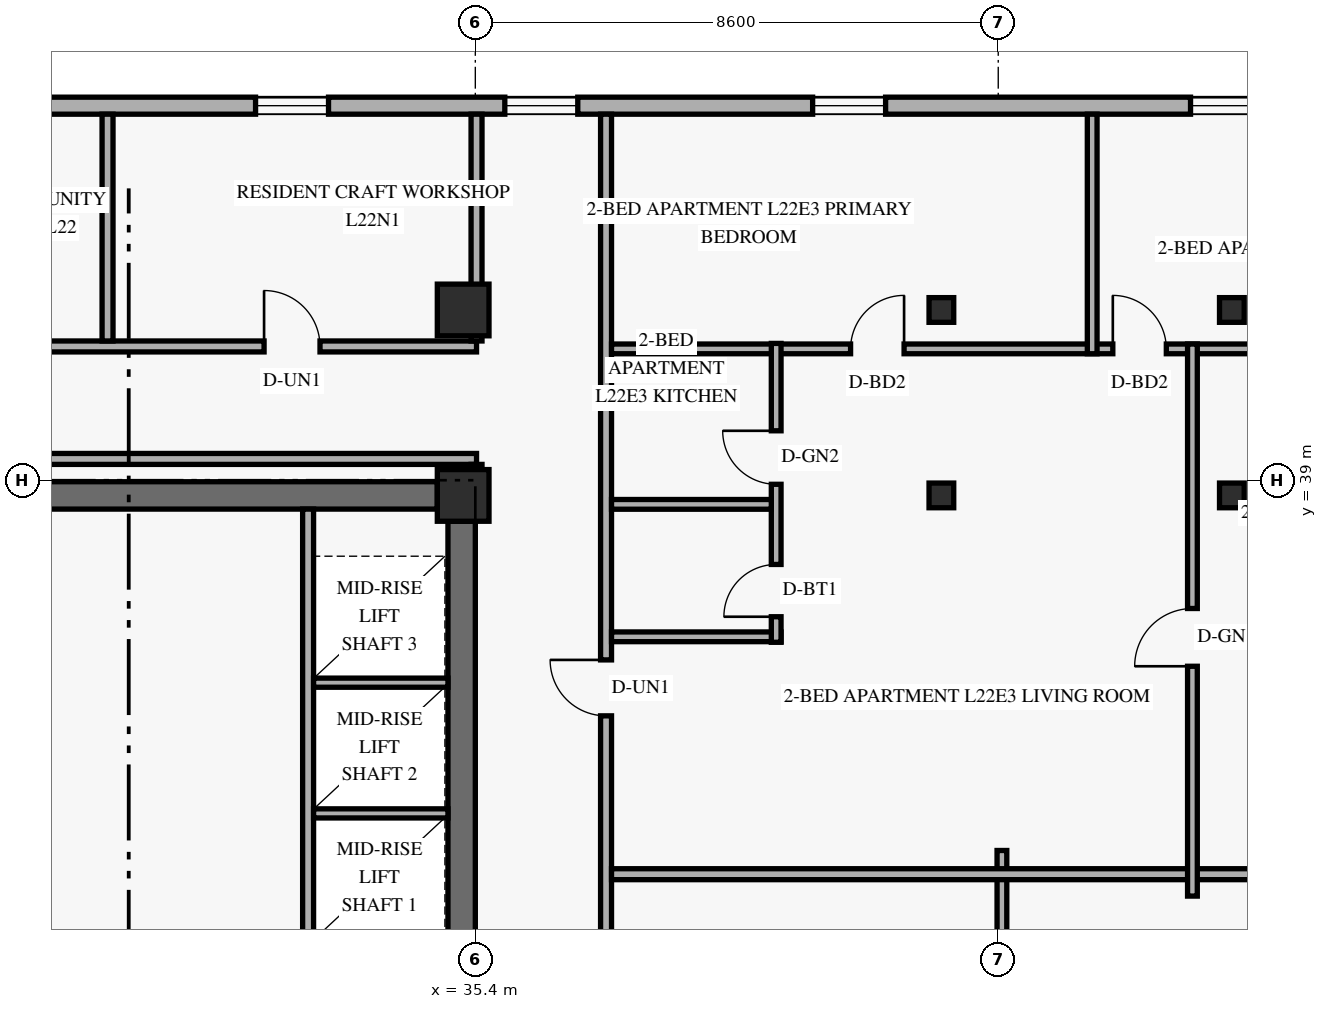
"""IFC4 building model, lengths in metres.
Left out: names, types, materials, properties, quantities, classifications, styles, units other than length and angle.
Written with IfcOpenShell. Run it as: python <this file> out.ifc"""

import sys

from ifc_helpers import new_model, si_unit, direction, frame, frame_2d, origin, origin_2d, place, context, subcontext, project, spatial, rectangle, hollow_rectangle, extrude, element, fill, save


model = new_model("IFC4")
c1 = context("Model", 3, precision=1e-05, world=origin(), true_north=direction((0.0, 1.0)))
c2 = subcontext(c1, "Body", "Model", "MODEL_VIEW")
j1 = project(units=[si_unit("LENGTHUNIT", "METRE"), si_unit("PLANEANGLEUNIT", "RADIAN")], contexts=[c1])
p1 = place(None, origin())
s1 = spatial("IfcSite", under=j1, at=p1, CompositionType="ELEMENT")
p2 = place(p1, origin())
s2 = spatial("IfcBuilding", under=s1, at=p2, CompositionType="ELEMENT")
p3 = place(p2, frame((0.0, 0.0, 87.6)))
s3 = spatial("IfcBuildingStorey", under=s2, at=p3, CompositionType="ELEMENT", Elevation=87.6)
p4 = place(p3, frame((35.175, 31.35, 0.0), z_axis=(0.0, 0.0, 1.0), x_axis=(0.0, 1.0, 0.0)))
e1 = element("IfcWall", 1, at=p4, inside=s3, PredefinedType="SHEAR", context=c2, shape_type="SweptSolid", body=[
    extrude(rectangle(XDim=6.975, YDim=0.45, at=frame_2d((3.487, 0.0))), origin(), (0.0, 0.0, 1.0), 2.749),
])
p5 = place(p3, frame((24.625, 38.75, 0.0), z_axis=(0.0, 0.0, 1.0), x_axis=(1.0, 0.0, 0.0)))
e2 = element("IfcWall", 2, at=p5, inside=s3, PredefinedType="SHEAR", context=c2, shape_type="SweptSolid", body=[
    extrude(rectangle(XDim=10.15, YDim=0.45, at=frame_2d((5.075, 0.0))), origin(), (0.0, 0.0, 1.0), 3.36),
])
for number, where, z_axis, x_axis in (
    (3, (35.2, 38.75, 0.0), (0.0, 0.0, 1.0), (1.0, 0.0, 0.0)),
    (4, (35.2, 41.8, 0.0), (0.0, 0.0, 1.0), (1.0, 0.0, 0.0)),
):
    element("IfcColumn", number, at=place(p3, frame(where, z_axis=z_axis, x_axis=x_axis)), inside=s3, PredefinedType="COLUMN", context=c2, shape_type="SweptSolid", body=[
        extrude(rectangle(XDim=0.85, YDim=0.85, at=origin_2d()), origin(), (0.0, 0.0, 1.0), 3.6),
    ])
for number, where, z_axis, x_axis in (
    (5, (43.002, 38.75, 0.0), (0.035, 0.0, 0.999), (0.0, 1.0, 0.0)),
    (6, (43.002, 41.8, 0.0), (0.035, 0.0, 0.999), (0.0, 1.0, 0.0)),
):
    element("IfcColumn", number, at=place(p3, frame(where, z_axis=z_axis, x_axis=x_axis)), inside=s3, PredefinedType="COLUMN", context=c2, shape_type="SweptSolid", body=[
        extrude(hollow_rectangle(XDim=0.406, YDim=0.406, WallThickness=0.016, at=origin_2d()), origin(), (0.0, 0.0, 1.0), 3.602),
    ])
for number, where, z_axis, x_axis in (
    (7, (47.738, 38.75, 0.0), (0.058, 0.0, 0.998), (0.0, 1.0, 0.0)),
    (8, (47.738, 41.8, 0.0), (0.058, 0.0, 0.998), (0.0, 1.0, 0.0)),
):
    element("IfcColumn", number, at=place(p3, frame(where, z_axis=z_axis, x_axis=x_axis)), inside=s3, PredefinedType="COLUMN", context=c2, shape_type="SweptSolid", body=[
        extrude(hollow_rectangle(XDim=0.406, YDim=0.406, WallThickness=0.016, at=origin_2d()), origin(), (0.0, 0.0, 1.0), 3.606),
    ])
p6 = place(p3, frame((49.98, 45.16, 0.0), z_axis=(0.0, 0.0, 1.0), x_axis=(-1.0, 0.0, 0.0)))
e9 = element("IfcWall", 9, at=p6, inside=s3, PredefinedType="SOLIDWALL", context=c2, shape_type="SweptSolid", body=[
    extrude(rectangle(XDim=36.56, YDim=0.28, at=frame_2d((18.28, 0.0))), origin(), (0.0, 0.0, 1.0), 3.36),
])
p7 = place(p6, frame((31.215, 0.0, 0.85)))
e10 = element("IfcOpeningElement", 10, at=p7, cuts=e9, PredefinedType="OPENING", context=c2, shape_type="SweptSolid", body=[
    extrude(rectangle(XDim=1.2, YDim=1.5, at=frame_2d((0.6, 0.75))), frame((0.0, 0.15, 0.0), z_axis=(0.0, -1.0, 0.0), x_axis=(1.0, 0.0, 0.0)), (0.0, 0.0, 1.0), 0.3),
])
p8 = place(p6, frame((26.68, 0.0, 0.85)))
e11 = element("IfcOpeningElement", 11, at=p8, cuts=e9, PredefinedType="OPENING", context=c2, shape_type="SweptSolid", body=[
    extrude(rectangle(XDim=1.2, YDim=1.5, at=frame_2d((0.6, 0.75))), frame((0.0, 0.15, 0.0), z_axis=(0.0, -1.0, 0.0), x_axis=(1.0, 0.0, 0.0)), (0.0, 0.0, 1.0), 0.3),
])
p9 = place(p6, frame((22.829, 0.0, 0.85)))
e12 = element("IfcOpeningElement", 12, at=p9, cuts=e9, PredefinedType="OPENING", context=c2, shape_type="SweptSolid", body=[
    extrude(rectangle(XDim=1.2, YDim=1.5, at=frame_2d((0.6, 0.75))), frame((0.0, 0.15, 0.0), z_axis=(0.0, -1.0, 0.0), x_axis=(1.0, 0.0, 0.0)), (0.0, 0.0, 1.0), 0.3),
])
p10 = place(p6, frame((16.994, 0.0, 0.85)))
e13 = element("IfcOpeningElement", 13, at=p10, cuts=e9, PredefinedType="OPENING", context=c2, shape_type="SweptSolid", body=[
    extrude(rectangle(XDim=1.2, YDim=1.5, at=frame_2d((0.6, 0.75))), frame((0.0, 0.15, 0.0), z_axis=(0.0, -1.0, 0.0), x_axis=(1.0, 0.0, 0.0)), (0.0, 0.0, 1.0), 0.3),
])
p11 = place(p6, frame((12.895, 0.0, 0.85)))
e14 = element("IfcOpeningElement", 14, at=p11, cuts=e9, PredefinedType="OPENING", context=c2, shape_type="SweptSolid", body=[
    extrude(rectangle(XDim=1.2, YDim=1.5, at=frame_2d((0.6, 0.75))), frame((0.0, 0.15, 0.0), z_axis=(0.0, -1.0, 0.0), x_axis=(1.0, 0.0, 0.0)), (0.0, 0.0, 1.0), 0.3),
])
p12 = place(p6, frame((7.833, 0.0, 0.85)))
e15 = element("IfcOpeningElement", 15, at=p12, cuts=e9, PredefinedType="OPENING", context=c2, shape_type="SweptSolid", body=[
    extrude(rectangle(XDim=1.2, YDim=1.5, at=frame_2d((0.6, 0.75))), frame((0.0, 0.15, 0.0), z_axis=(0.0, -1.0, 0.0), x_axis=(1.0, 0.0, 0.0)), (0.0, 0.0, 1.0), 0.3),
])
p13 = place(p6, frame((1.617, 0.0, 0.85)))
e16 = element("IfcOpeningElement", 16, at=p13, cuts=e9, PredefinedType="OPENING", context=c2, shape_type="SweptSolid", body=[
    extrude(rectangle(XDim=1.2, YDim=1.5, at=frame_2d((0.6, 0.75))), frame((0.0, 0.15, 0.0), z_axis=(0.0, -1.0, 0.0), x_axis=(1.0, 0.0, 0.0)), (0.0, 0.0, 1.0), 0.3),
])
p14 = place(p3, frame((32.65, 31.35, 0.0), z_axis=(0.0, 0.0, 1.0), x_axis=(0.0, 1.0, 0.0)))
e17 = element("IfcWall", 17, at=p14, inside=s3, PredefinedType="STANDARD", context=c2, shape_type="SweptSolid", body=[
    extrude(rectangle(XDim=7.175, YDim=0.18, at=frame_2d((3.587, 0.0))), origin(), (0.0, 0.0, 1.0), 3.36),
])
for number, where, z_axis, x_axis in (
    (18, (32.74, 33.52, 0.0), (0.0, 0.0, 1.0), (1.0, 0.0, 0.0)),
    (19, (32.74, 35.67, 0.0), (0.0, 0.0, 1.0), (1.0, 0.0, 0.0)),
):
    element("IfcWall", number, at=place(p3, frame(where, z_axis=z_axis, x_axis=x_axis)), inside=s3, PredefinedType="STANDARD", context=c2, shape_type="SweptSolid", body=[
        extrude(rectangle(XDim=2.21, YDim=0.15, at=frame_2d((1.105, 0.0))), origin(), (0.0, 0.0, 1.0), 3.36),
    ])
p15 = place(p3, frame((37.55, 2.98, 0.0), z_axis=(0.0, 0.0, 1.0), x_axis=(0.0, 1.0, 0.0)))
e20 = element("IfcWall", 20, at=p15, inside=s3, PredefinedType="STANDARD", context=c2, shape_type="SweptSolid", body=[
    extrude(rectangle(XDim=42.04, YDim=0.18, at=frame_2d((21.02, 0.0))), origin(), (0.0, 0.0, 1.0), 2.731),
])
p16 = place(p15, frame((8.69, 0.0, 0.0)))
e21 = element("IfcOpeningElement", 21, at=p16, cuts=e20, PredefinedType="OPENING", context=c2, shape_type="SweptSolid", body=[
    extrude(rectangle(XDim=0.92, YDim=2.15, at=frame_2d((0.46, 1.075))), frame((0.0, 0.1, 0.0), z_axis=(0.0, -1.0, 0.0), x_axis=(1.0, 0.0, 0.0)), (0.0, 0.0, 1.0), 0.2),
])
p17 = place(p15, frame((19.043, 0.0, 0.0)))
e22 = element("IfcOpeningElement", 22, at=p17, cuts=e20, PredefinedType="OPENING", context=c2, shape_type="SweptSolid", body=[
    extrude(rectangle(XDim=0.92, YDim=2.15, at=frame_2d((0.46, 1.075))), frame((0.0, 0.1, 0.0), z_axis=(0.0, -1.0, 0.0), x_axis=(1.0, 0.0, 0.0)), (0.0, 0.0, 1.0), 0.2),
])
p18 = place(p15, frame((32.145, 0.0, 0.0)))
e23 = element("IfcOpeningElement", 23, at=p18, cuts=e20, PredefinedType="OPENING", context=c2, shape_type="SweptSolid", body=[
    extrude(rectangle(XDim=0.92, YDim=2.15, at=frame_2d((0.46, 1.075))), frame((0.0, 0.1, 0.0), z_axis=(0.0, -1.0, 0.0), x_axis=(1.0, 0.0, 0.0)), (0.0, 0.0, 1.0), 0.2),
])
p19 = place(p3, frame((23.75, 41.2, 0.0), z_axis=(0.0, 0.0, 1.0), x_axis=(1.0, 0.0, 0.0)))
e24 = element("IfcWall", 24, at=p19, inside=s3, PredefinedType="STANDARD", context=c2, shape_type="SweptSolid", body=[
    extrude(rectangle(XDim=11.67, YDim=0.18, at=frame_2d((5.835, 0.0))), origin(), (0.0, 0.0, 1.0), 2.731),
])
p20 = place(p19, frame((1.6, 0.0, 0.0)))
e25 = element("IfcOpeningElement", 25, at=p20, cuts=e24, PredefinedType="OPENING", context=c2, shape_type="SweptSolid", body=[
    extrude(rectangle(XDim=0.95, YDim=2.15, at=frame_2d((0.475, 1.075))), frame((0.0, 0.1, 0.0), z_axis=(0.0, -1.0, 0.0), x_axis=(1.0, 0.0, 0.0)), (0.0, 0.0, 1.0), 0.2),
])
p21 = place(p19, frame((8.176, 0.0, 0.0)))
e26 = element("IfcOpeningElement", 26, at=p21, cuts=e24, PredefinedType="OPENING", context=c2, shape_type="SweptSolid", body=[
    extrude(rectangle(XDim=0.92, YDim=2.15, at=frame_2d((0.46, 1.075))), frame((0.0, 0.1, 0.0), z_axis=(0.0, -1.0, 0.0), x_axis=(1.0, 0.0, 0.0)), (0.0, 0.0, 1.0), 0.2),
])
p22 = place(p3, frame((23.75, 39.35, 0.0), z_axis=(0.0, 0.0, 1.0), x_axis=(1.0, 0.0, 0.0)))
e27 = element("IfcWall", 27, at=p22, inside=s3, PredefinedType="STANDARD", context=c2, shape_type="SweptSolid", body=[
    extrude(rectangle(XDim=11.67, YDim=0.18, at=frame_2d((5.835, 0.0))), origin(), (0.0, 0.0, 1.0), 2.731),
])
p23 = place(p3, frame((35.42, 38.75, 0.0), z_axis=(0.0, 0.0, 1.0), x_axis=(0.0, 1.0, 0.0)))
e28 = element("IfcWall", 28, at=p23, inside=s3, PredefinedType="STANDARD", context=c2, shape_type="SweptSolid", body=[
    extrude(rectangle(XDim=0.51, YDim=0.18, at=frame_2d((0.255, 0.0))), origin(), (0.0, 0.0, 1.0), 2.731),
])
p24 = place(p3, frame((35.42, 41.29, 0.0), z_axis=(0.0, 0.0, 1.0), x_axis=(0.0, 1.0, 0.0)))
e29 = element("IfcWall", 29, at=p24, inside=s3, PredefinedType="PARTITIONING", context=c2, shape_type="SweptSolid", body=[
    extrude(rectangle(XDim=3.73, YDim=0.18, at=frame_2d((1.865, 0.0))), origin(), (0.0, 0.0, 1.0), 2.731),
])
p25 = place(p3, frame((44.061, 27.95, 0.0), z_axis=(0.0, 0.0, 1.0), x_axis=(0.0, 1.0, 0.0)))
e30 = element("IfcWall", 30, at=p25, inside=s3, PredefinedType="PARTITIONING", context=c2, shape_type="SweptSolid", body=[
    extrude(rectangle(XDim=4.96, YDim=0.16, at=frame_2d((2.48, 0.0))), origin(), (0.0, 0.0, 1.0), 2.731),
])
p26 = place(p3, frame((37.64, 32.52, 0.0), z_axis=(0.0, 0.0, 1.0), x_axis=(1.0, 0.0, 0.0)))
e31 = element("IfcWall", 31, at=p26, inside=s3, PredefinedType="PARTITIONING", context=c2, shape_type="SweptSolid", body=[
    extrude(rectangle(XDim=15.68, YDim=0.18, at=frame_2d((7.84, 0.0))), origin(), (0.0, 0.0, 1.0), 2.731),
])
p27 = place(p3, frame((37.64, 41.16, 0.0), z_axis=(0.0, 0.0, 1.0), x_axis=(1.0, 0.0, 0.0)))
e32 = element("IfcWall", 32, at=p27, inside=s3, PredefinedType="PARTITIONING", context=c2, shape_type="SweptSolid", body=[
    extrude(rectangle(XDim=15.68, YDim=0.16, at=frame_2d((7.84, 0.0))), origin(), (0.0, 0.0, 1.0), 2.731),
])
p28 = place(p27, frame((3.931, 0.0, 0.0)))
e33 = element("IfcOpeningElement", 33, at=p28, cuts=e32, PredefinedType="OPENING", context=c2, shape_type="SweptSolid", body=[
    extrude(rectangle(XDim=0.88, YDim=2.14, at=frame_2d((0.44, 1.07))), frame((0.0, 0.09, 0.0), z_axis=(0.0, -1.0, 0.0), x_axis=(1.0, 0.0, 0.0)), (0.0, 0.0, 1.0), 0.18),
])
p29 = place(p27, frame((8.244, 0.0, 0.0)))
e34 = element("IfcOpeningElement", 34, at=p29, cuts=e32, PredefinedType="OPENING", context=c2, shape_type="SweptSolid", body=[
    extrude(rectangle(XDim=0.88, YDim=2.14, at=frame_2d((0.44, 1.07))), frame((0.0, 0.09, 0.0), z_axis=(0.0, -1.0, 0.0), x_axis=(1.0, 0.0, 0.0)), (0.0, 0.0, 1.0), 0.18),
])
p30 = place(p3, frame((37.64, 36.425, 0.0), z_axis=(0.0, 0.0, 1.0), x_axis=(1.0, 0.0, 0.0)))
e35 = element("IfcWall", 35, at=p30, inside=s3, PredefinedType="PLUMBINGWALL", context=c2, shape_type="SweptSolid", body=[
    extrude(rectangle(XDim=2.788, YDim=0.16, at=frame_2d((1.394, 0.0))), origin(), (0.0, 0.0, 1.0), 3.36),
])
p31 = place(p3, frame((40.348, 36.334, 0.0), z_axis=(0.0, 0.0, 1.0), x_axis=(0.0, 1.0, 0.0)))
e36 = element("IfcWall", 36, at=p31, inside=s3, PredefinedType="PLUMBINGWALL", context=c2, shape_type="SweptSolid", body=[
    extrude(rectangle(XDim=4.916, YDim=0.16, at=frame_2d((2.458, 0.0))), origin(), (0.0, 0.0, 1.0), 2.731),
])
p32 = place(p31, frame((0.42, 0.0, 0.0)))
e37 = element("IfcOpeningElement", 37, at=p32, cuts=e36, PredefinedType="OPENING", context=c2, shape_type="SweptSolid", body=[
    extrude(rectangle(XDim=0.86, YDim=2.12, at=frame_2d((0.43, 1.06))), frame((0.0, 0.09, 0.0), z_axis=(0.0, -1.0, 0.0), x_axis=(1.0, 0.0, 0.0)), (0.0, 0.0, 1.0), 0.18),
])
p33 = place(p31, frame((2.598, 0.0, 0.0)))
e38 = element("IfcOpeningElement", 38, at=p33, cuts=e36, PredefinedType="OPENING", context=c2, shape_type="SweptSolid", body=[
    extrude(rectangle(XDim=0.88, YDim=2.12, at=frame_2d((0.44, 1.06))), frame((0.0, 0.09, 0.0), z_axis=(0.0, -1.0, 0.0), x_axis=(1.0, 0.0, 0.0)), (0.0, 0.0, 1.0), 0.18),
])
p34 = place(p3, frame((37.64, 38.603, 0.0), z_axis=(0.0, 0.0, 1.0), x_axis=(1.0, 0.0, 0.0)))
e39 = element("IfcWall", 39, at=p34, inside=s3, PredefinedType="PLUMBINGWALL", context=c2, shape_type="SweptSolid", body=[
    extrude(rectangle(XDim=2.628, YDim=0.16, at=frame_2d((1.314, 0.0))), origin(), (0.0, 0.0, 1.0), 2.731),
])
p35 = place(p3, frame((47.194, 32.16, 0.0), z_axis=(0.0, 0.0, 1.0), x_axis=(0.0, 1.0, 0.0)))
e40 = element("IfcWall", 40, at=p35, inside=s3, PredefinedType="PARTITIONING", context=c2, shape_type="SweptSolid", body=[
    extrude(rectangle(XDim=9.08, YDim=0.16, at=frame_2d((4.54, 0.0))), origin(), (0.0, 0.0, 1.0), 2.731),
])
p36 = place(p35, frame((3.78, 0.0, 0.0)))
e41 = element("IfcOpeningElement", 41, at=p36, cuts=e40, PredefinedType="OPENING", context=c2, shape_type="SweptSolid", body=[
    extrude(rectangle(XDim=0.95, YDim=2.15, at=frame_2d((0.475, 1.075))), frame((0.0, 0.09, 0.0), z_axis=(0.0, -1.0, 0.0), x_axis=(1.0, 0.0, 0.0)), (0.0, 0.0, 1.0), 0.18),
])
p37 = place(p3, frame((45.545, 41.08, 0.0), z_axis=(0.0, 0.0, 1.0), x_axis=(0.0, 1.0, 0.0)))
e42 = element("IfcWall", 42, at=p37, inside=s3, PredefinedType="PARTITIONING", context=c2, shape_type="SweptSolid", body=[
    extrude(rectangle(XDim=3.94, YDim=0.16, at=frame_2d((1.97, 0.0))), origin(), (0.0, 0.0, 1.0), 2.809),
])
p38 = place(p3, frame((29.352, 41.29, 0.0), z_axis=(0.0, 0.0, 1.0), x_axis=(0.0, 1.0, 0.0)))
e43 = element("IfcWall", 43, at=p38, inside=s3, PredefinedType="PARTITIONING", context=c2, shape_type="SweptSolid", body=[
    extrude(rectangle(XDim=3.73, YDim=0.18, at=frame_2d((1.865, 0.0))), origin(), (0.0, 0.0, 1.0), 2.809),
])
p39 = place(p10, origin())
e44 = element("IfcWindow", 44, at=p39, inside=s3, PartitioningType="SINGLE_PANEL", PredefinedType="WINDOW", context=c2, shape_type="SweptSolid", body=[
    extrude(rectangle(XDim=1.2, YDim=1.5, at=frame_2d((0.6, 0.75))), frame((0.0, 0.03, 0.0), z_axis=(0.0, -1.0, 0.0), x_axis=(1.0, 0.0, 0.0)), (0.0, 0.0, 1.0), 0.06),
])
fill(e13, e44)
p40 = place(p11, origin())
e45 = element("IfcWindow", 45, at=p40, inside=s3, PartitioningType="SINGLE_PANEL", PredefinedType="WINDOW", context=c2, shape_type="SweptSolid", body=[
    extrude(rectangle(XDim=1.2, YDim=1.5, at=frame_2d((0.6, 0.75))), frame((0.0, 0.03, 0.0), z_axis=(0.0, -1.0, 0.0), x_axis=(1.0, 0.0, 0.0)), (0.0, 0.0, 1.0), 0.06),
])
fill(e14, e45)
p41 = place(p12, origin())
e46 = element("IfcWindow", 46, at=p41, inside=s3, PartitioningType="SINGLE_PANEL", PredefinedType="WINDOW", context=c2, shape_type="SweptSolid", body=[
    extrude(rectangle(XDim=1.2, YDim=1.5, at=frame_2d((0.6, 0.75))), frame((0.0, 0.03, 0.0), z_axis=(0.0, -1.0, 0.0), x_axis=(1.0, 0.0, 0.0)), (0.0, 0.0, 1.0), 0.06),
])
fill(e15, e46)
p42 = place(p13, origin())
e47 = element("IfcWindow", 47, at=p42, inside=s3, PartitioningType="SINGLE_PANEL", PredefinedType="WINDOW", context=c2, shape_type="SweptSolid", body=[
    extrude(rectangle(XDim=1.2, YDim=1.5, at=frame_2d((0.6, 0.75))), frame((0.0, 0.03, 0.0), z_axis=(0.0, -1.0, 0.0), x_axis=(1.0, 0.0, 0.0)), (0.0, 0.0, 1.0), 0.06),
])
fill(e16, e47)
p43 = place(p36, origin())
e48 = element("IfcDoor", 48, at=p43, inside=s3, OperationType="SINGLE_SWING_LEFT", PredefinedType="DOOR", context=c2, shape_type="SweptSolid", body=[
    extrude(rectangle(XDim=0.95, YDim=2.15, at=frame_2d((0.475, 1.075))), frame((0.0, 0.025, 0.0), z_axis=(0.0, -1.0, 0.0), x_axis=(1.0, 0.0, 0.0)), (0.0, 0.0, 1.0), 0.05),
])
fill(e41, e48)
p44 = place(p18, origin())
e49 = element("IfcDoor", 49, at=p44, inside=s3, OperationType="SINGLE_SWING_RIGHT", PredefinedType="DOOR", context=c2, shape_type="SweptSolid", body=[
    extrude(rectangle(XDim=0.92, YDim=2.15, at=frame_2d((0.46, 1.075))), frame((0.0, 0.025, 0.0), z_axis=(0.0, -1.0, 0.0), x_axis=(1.0, 0.0, 0.0)), (0.0, 0.0, 1.0), 0.05),
])
fill(e23, e49)
p45 = place(p32, origin())
e50 = element("IfcDoor", 50, at=p45, inside=s3, OperationType="SINGLE_SWING_LEFT", PredefinedType="DOOR", context=c2, shape_type="SweptSolid", body=[
    extrude(rectangle(XDim=0.86, YDim=2.12, at=frame_2d((0.43, 1.06))), frame((0.0, 0.025, 0.0), z_axis=(0.0, -1.0, 0.0), x_axis=(1.0, 0.0, 0.0)), (0.0, 0.0, 1.0), 0.05),
])
fill(e37, e50)
p46 = place(p33, origin())
e51 = element("IfcDoor", 51, at=p46, inside=s3, OperationType="SINGLE_SWING_RIGHT", PredefinedType="DOOR", context=c2, shape_type="SweptSolid", body=[
    extrude(rectangle(XDim=0.88, YDim=2.12, at=frame_2d((0.44, 1.06))), frame((0.0, 0.025, 0.0), z_axis=(0.0, -1.0, 0.0), x_axis=(1.0, 0.0, 0.0)), (0.0, 0.0, 1.0), 0.05),
])
fill(e38, e51)
p47 = place(p28, origin())
e52 = element("IfcDoor", 52, at=p47, inside=s3, OperationType="SINGLE_SWING_RIGHT", PredefinedType="DOOR", context=c2, shape_type="SweptSolid", body=[
    extrude(rectangle(XDim=0.88, YDim=2.14, at=frame_2d((0.44, 1.07))), frame((0.0, 0.025, 0.0), z_axis=(0.0, -1.0, 0.0), x_axis=(1.0, 0.0, 0.0)), (0.0, 0.0, 1.0), 0.05),
])
fill(e33, e52)
p48 = place(p29, origin())
e53 = element("IfcDoor", 53, at=p48, inside=s3, OperationType="SINGLE_SWING_LEFT", PredefinedType="DOOR", context=c2, shape_type="SweptSolid", body=[
    extrude(rectangle(XDim=0.88, YDim=2.14, at=frame_2d((0.44, 1.07))), frame((0.0, 0.025, 0.0), z_axis=(0.0, -1.0, 0.0), x_axis=(1.0, 0.0, 0.0)), (0.0, 0.0, 1.0), 0.05),
])
fill(e34, e53)
p49 = place(p21, origin())
e54 = element("IfcDoor", 54, at=p49, inside=s3, OperationType="SINGLE_SWING_LEFT", PredefinedType="DOOR", context=c2, shape_type="SweptSolid", body=[
    extrude(rectangle(XDim=0.92, YDim=2.15, at=frame_2d((0.46, 1.075))), frame((0.0, 0.025, 0.0), z_axis=(0.0, -1.0, 0.0), x_axis=(1.0, 0.0, 0.0)), (0.0, 0.0, 1.0), 0.05),
])
fill(e26, e54)
save(model, sys.argv[1])
